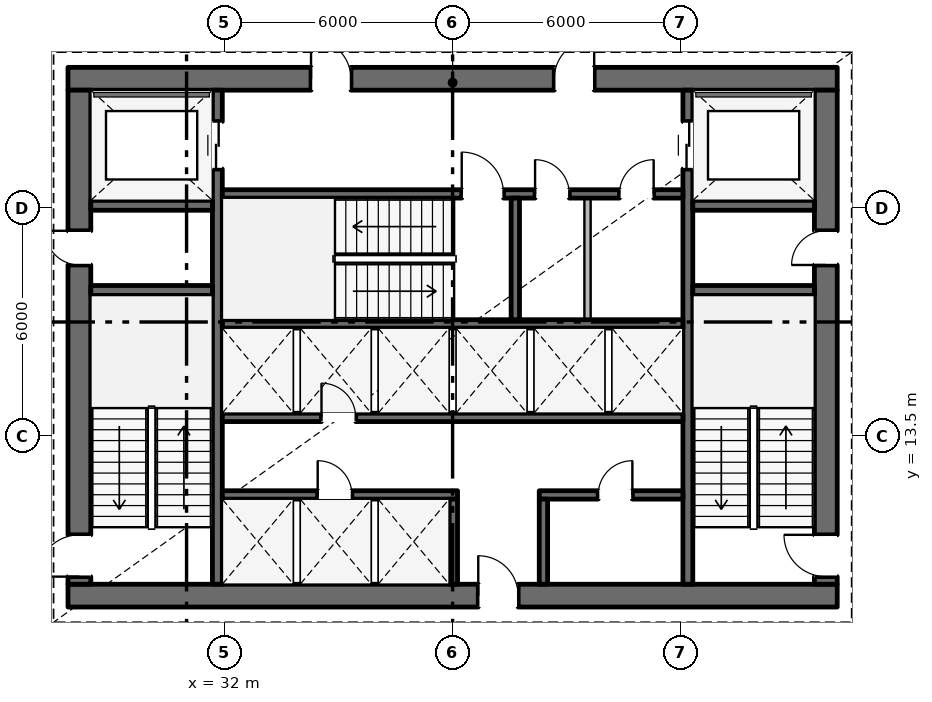
"""IFC4 building model, lengths in metres.
Left out: names, types, materials, properties, quantities, classifications, styles, units other than length and angle.
Written with IfcOpenShell. Run it as: python <this file> out.ifc"""

import sys

from ifc_helpers import new_model, si_unit, direction, frame, frame_2d, origin, place, context, subcontext, project, spatial, rectangle, extrude, element, fill, save


model = new_model("IFC4")
c1 = context("Model", 3, precision=1e-05, world=origin(), true_north=direction((0.0, 1.0)))
c2 = subcontext(c1, "Body", "Model", "MODEL_VIEW")
j1 = project(units=[si_unit("LENGTHUNIT", "METRE"), si_unit("PLANEANGLEUNIT", "RADIAN")], contexts=[c1])
p1 = place(None, origin())
s1 = spatial("IfcSite", under=j1, at=p1, CompositionType="ELEMENT")
p2 = place(p1, origin())
s2 = spatial("IfcBuilding", under=s1, at=p2, CompositionType="ELEMENT")
p3 = place(p2, frame((0.0, 0.0, -8.4)))
s3 = spatial("IfcBuildingStorey", under=s2, at=p3, CompositionType="ELEMENT", Elevation=-8.4)
for number, where, z_axis, x_axis in (
    (1, (29.622, 43.889, 0.0), (0.0, 0.0, 1.0), (-0.5, -0.866, 0.0)),
    (2, (62.878, 15.311, 0.0), (0.0, 0.0, 1.0), (-0.5, 0.866, 0.0)),
):
    element("IfcWall", number, at=place(p3, frame(where, z_axis=z_axis, x_axis=x_axis)), inside=s3, PredefinedType="SHEAR", context=c2, shape_type="SweptSolid", body=[
        extrude(rectangle(XDim=33.0, YDim=0.5, at=frame_2d((16.5, 0.0))), origin(), (0.0, 0.0, 1.0), 3.95),
    ])
p4 = place(p3, frame((27.88, 9.3, 0.0), z_axis=(0.0, 0.0, 1.0), x_axis=(1.0, 0.0, 0.0)))
e3 = element("IfcWall", 3, at=p4, inside=s3, PredefinedType="SOLIDWALL", context=c2, shape_type="SweptSolid", body=[
    extrude(rectangle(XDim=20.24, YDim=0.6, at=frame_2d((10.12, 0.0))), origin(), (0.0, 0.0, 1.0), 3.95),
])
p5 = place(p4, frame((10.795, 0.0, 0.0)))
e4 = element("IfcOpeningElement", 4, at=p5, cuts=e3, PredefinedType="OPENING", context=c2, shape_type="SweptSolid", body=[
    extrude(rectangle(XDim=1.05, YDim=2.15, at=frame_2d((0.525, 1.075))), frame((0.0, 0.31, 0.0), z_axis=(0.0, -1.0, 0.0), x_axis=(1.0, 0.0, 0.0)), (0.0, 0.0, 1.0), 0.62),
])
p6 = place(p3, frame((27.88, 22.9, 0.0), z_axis=(0.0, 0.0, 1.0), x_axis=(1.0, 0.0, 0.0)))
e5 = element("IfcWall", 5, at=p6, inside=s3, PredefinedType="SOLIDWALL", context=c2, shape_type="SweptSolid", body=[
    extrude(rectangle(XDim=20.24, YDim=0.6, at=frame_2d((10.12, 0.0))), origin(), (0.0, 0.0, 1.0), 3.95),
])
p7 = place(p6, frame((6.395, 0.0, 0.0)))
e6 = element("IfcOpeningElement", 6, at=p7, cuts=e5, PredefinedType="OPENING", context=c2, shape_type="SweptSolid", body=[
    extrude(rectangle(XDim=1.05, YDim=2.15, at=frame_2d((0.525, 1.075))), frame((0.0, 0.31, 0.0), z_axis=(0.0, -1.0, 0.0), x_axis=(1.0, 0.0, 0.0)), (0.0, 0.0, 1.0), 0.62),
])
p8 = place(p6, frame((12.795, 0.0, 0.0)))
e7 = element("IfcOpeningElement", 7, at=p8, cuts=e5, PredefinedType="OPENING", context=c2, shape_type="SweptSolid", body=[
    extrude(rectangle(XDim=1.05, YDim=2.15, at=frame_2d((0.525, 1.075))), frame((0.0, 0.31, 0.0), z_axis=(0.0, -1.0, 0.0), x_axis=(1.0, 0.0, 0.0)), (0.0, 0.0, 1.0), 0.62),
])
p9 = place(p3, frame((28.18, 9.6, 0.0), z_axis=(0.0, 0.0, 1.0), x_axis=(0.0, 1.0, 0.0)))
e8 = element("IfcWall", 8, at=p9, inside=s3, PredefinedType="SOLIDWALL", context=c2, shape_type="SweptSolid", body=[
    extrude(rectangle(XDim=13.0, YDim=0.6, at=frame_2d((6.5, 0.0))), origin(), (0.0, 0.0, 1.0), 3.95),
])
p10 = place(p9, frame((0.2, 0.0, 0.0)))
e9 = element("IfcOpeningElement", 9, at=p10, cuts=e8, PredefinedType="OPENING", context=c2, shape_type="SweptSolid", body=[
    extrude(rectangle(XDim=1.1, YDim=2.15, at=frame_2d((0.55, 1.075))), frame((0.0, 0.31, 0.0), z_axis=(0.0, -1.0, 0.0), x_axis=(1.0, 0.0, 0.0)), (0.0, 0.0, 1.0), 0.62),
])
p11 = place(p9, frame((8.4, 0.0, 0.0)))
e10 = element("IfcOpeningElement", 10, at=p11, cuts=e8, PredefinedType="OPENING", context=c2, shape_type="SweptSolid", body=[
    extrude(rectangle(XDim=0.9, YDim=2.1, at=frame_2d((0.45, 1.05))), frame((0.0, 0.31, 0.0), z_axis=(0.0, -1.0, 0.0), x_axis=(1.0, 0.0, 0.0)), (0.0, 0.0, 1.0), 0.62),
])
p12 = place(p3, frame((47.82, 9.6, 0.0), z_axis=(0.0, 0.0, 1.0), x_axis=(0.0, 1.0, 0.0)))
e11 = element("IfcWall", 11, at=p12, inside=s3, PredefinedType="SOLIDWALL", context=c2, shape_type="SweptSolid", body=[
    extrude(rectangle(XDim=13.0, YDim=0.6, at=frame_2d((6.5, 0.0))), origin(), (0.0, 0.0, 1.0), 3.95),
])
p13 = place(p12, frame((0.2, 0.0, 0.0)))
e12 = element("IfcOpeningElement", 12, at=p13, cuts=e11, PredefinedType="OPENING", context=c2, shape_type="SweptSolid", body=[
    extrude(rectangle(XDim=1.1, YDim=2.15, at=frame_2d((0.55, 1.075))), frame((0.0, 0.31, 0.0), z_axis=(0.0, -1.0, 0.0), x_axis=(1.0, 0.0, 0.0)), (0.0, 0.0, 1.0), 0.62),
])
p14 = place(p12, frame((8.4, 0.0, 0.0)))
e13 = element("IfcOpeningElement", 13, at=p14, cuts=e11, PredefinedType="OPENING", context=c2, shape_type="SweptSolid", body=[
    extrude(rectangle(XDim=0.9, YDim=2.1, at=frame_2d((0.45, 1.05))), frame((0.0, 0.31, 0.0), z_axis=(0.0, -1.0, 0.0), x_axis=(1.0, 0.0, 0.0)), (0.0, 0.0, 1.0), 0.62),
])
p15 = place(p3, frame((31.81, 9.6, 0.0), z_axis=(0.0, 0.0, 1.0), x_axis=(0.0, 1.0, 0.0)))
e14 = element("IfcWall", 14, at=p15, inside=s3, PredefinedType="SHEAR", context=c2, shape_type="SweptSolid", body=[
    extrude(rectangle(XDim=13.0, YDim=0.26, at=frame_2d((6.5, 0.0))), origin(), (0.0, 0.0, 1.0), 3.95),
])
p16 = place(p15, frame((10.925, 0.0, 0.0)))
e15 = element("IfcOpeningElement", 15, at=p16, cuts=e14, PredefinedType="OPENING", context=c2, shape_type="SweptSolid", body=[
    extrude(rectangle(XDim=1.25, YDim=2.25, at=frame_2d((0.625, 1.125))), frame((0.0, 0.14, 0.0), z_axis=(0.0, -1.0, 0.0), x_axis=(1.0, 0.0, 0.0)), (0.0, 0.0, 1.0), 0.28),
])
p17 = place(p3, frame((44.19, 9.6, 0.0), z_axis=(0.0, 0.0, 1.0), x_axis=(0.0, 1.0, 0.0)))
e16 = element("IfcWall", 16, at=p17, inside=s3, PredefinedType="SHEAR", context=c2, shape_type="SweptSolid", body=[
    extrude(rectangle(XDim=13.0, YDim=0.26, at=frame_2d((6.5, 0.0))), origin(), (0.0, 0.0, 1.0), 3.95),
])
p18 = place(p17, frame((10.925, 0.0, 0.0)))
e17 = element("IfcOpeningElement", 17, at=p18, cuts=e16, PredefinedType="OPENING", context=c2, shape_type="SweptSolid", body=[
    extrude(rectangle(XDim=1.25, YDim=2.25, at=frame_2d((0.625, 1.125))), frame((0.0, 0.14, 0.0), z_axis=(0.0, -1.0, 0.0), x_axis=(1.0, 0.0, 0.0)), (0.0, 0.0, 1.0), 0.28),
])
for number, where, z_axis, x_axis in (
    (18, (28.48, 17.33, 0.0), (0.0, 0.0, 1.0), (1.0, 0.0, 0.0)),
    (19, (28.48, 19.57, 0.0), (0.0, 0.0, 1.0), (1.0, 0.0, 0.0)),
    (20, (44.32, 17.33, 0.0), (0.0, 0.0, 1.0), (1.0, 0.0, 0.0)),
    (21, (44.32, 19.57, 0.0), (0.0, 0.0, 1.0), (1.0, 0.0, 0.0)),
):
    element("IfcWall", number, at=place(p3, frame(where, z_axis=z_axis, x_axis=x_axis)), inside=s3, PredefinedType="SHEAR", context=c2, shape_type="SweptSolid", body=[
        extrude(rectangle(XDim=3.2, YDim=0.26, at=frame_2d((1.6, 0.0))), origin(), (0.0, 0.0, 1.0), 3.95),
    ])
p19 = place(p3, frame((31.94, 19.87, 0.0), z_axis=(0.0, 0.0, 1.0), x_axis=(1.0, 0.0, 0.0)))
e22 = element("IfcWall", 22, at=p19, inside=s3, PredefinedType="SOLIDWALL", context=c2, shape_type="SweptSolid", body=[
    extrude(rectangle(XDim=12.12, YDim=0.22, at=frame_2d((6.06, 0.0))), origin(), (0.0, 0.0, 1.0), 3.95),
])
p20 = place(p19, frame((6.3, 0.0, 0.0)))
e23 = element("IfcOpeningElement", 23, at=p20, cuts=e22, PredefinedType="OPENING", context=c2, shape_type="SweptSolid", body=[
    extrude(rectangle(XDim=1.1, YDim=2.15, at=frame_2d((0.55, 1.075))), frame((0.0, 0.12, 0.0), z_axis=(0.0, -1.0, 0.0), x_axis=(1.0, 0.0, 0.0)), (0.0, 0.0, 1.0), 0.24),
])
p21 = place(p19, frame((8.23, 0.0, 0.0)))
e24 = element("IfcOpeningElement", 24, at=p21, cuts=e22, PredefinedType="OPENING", context=c2, shape_type="SweptSolid", body=[
    extrude(rectangle(XDim=0.9, YDim=2.1, at=frame_2d((0.45, 1.05))), frame((0.0, 0.12, 0.0), z_axis=(0.0, -1.0, 0.0), x_axis=(1.0, 0.0, 0.0)), (0.0, 0.0, 1.0), 0.24),
])
p22 = place(p19, frame((10.45, 0.0, 0.0)))
e25 = element("IfcOpeningElement", 25, at=p22, cuts=e22, PredefinedType="OPENING", context=c2, shape_type="SweptSolid", body=[
    extrude(rectangle(XDim=0.9, YDim=2.1, at=frame_2d((0.45, 1.05))), frame((0.0, 0.12, 0.0), z_axis=(0.0, -1.0, 0.0), x_axis=(1.0, 0.0, 0.0)), (0.0, 0.0, 1.0), 0.24),
])
p23 = place(p3, frame((31.94, 16.45, 0.0), z_axis=(0.0, 0.0, 1.0), x_axis=(1.0, 0.0, 0.0)))
e26 = element("IfcWall", 26, at=p23, inside=s3, PredefinedType="SOLIDWALL", context=c2, shape_type="SweptSolid", body=[
    extrude(rectangle(XDim=12.12, YDim=0.22, at=frame_2d((6.06, 0.0))), origin(), (0.0, 0.0, 1.0), 3.95),
])
p24 = place(p3, frame((39.65, 16.56, 0.0), z_axis=(0.0, 0.0, 1.0), x_axis=(0.0, 1.0, 0.0)))
e27 = element("IfcWall", 27, at=p24, inside=s3, PredefinedType="SOLIDWALL", context=c2, shape_type="SweptSolid", body=[
    extrude(rectangle(XDim=3.2, YDim=0.22, at=frame_2d((1.6, 0.0))), origin(), (0.0, 0.0, 1.0), 3.95),
])
p25 = place(p3, frame((31.94, 13.99, 0.0), z_axis=(0.0, 0.0, 1.0), x_axis=(1.0, 0.0, 0.0)))
e28 = element("IfcWall", 28, at=p25, inside=s3, PredefinedType="SOLIDWALL", context=c2, shape_type="SweptSolid", body=[
    extrude(rectangle(XDim=12.12, YDim=0.22, at=frame_2d((6.06, 0.0))), origin(), (0.0, 0.0, 1.0), 3.95),
])
p26 = place(p25, frame((2.61, 0.0, 0.0)))
e29 = element("IfcOpeningElement", 29, at=p26, cuts=e28, PredefinedType="OPENING", context=c2, shape_type="SweptSolid", body=[
    extrude(rectangle(XDim=0.9, YDim=2.1, at=frame_2d((0.45, 1.05))), frame((0.0, 0.12, 0.0), z_axis=(0.0, -1.0, 0.0), x_axis=(1.0, 0.0, 0.0)), (0.0, 0.0, 1.0), 0.24),
])
p27 = place(p3, frame((31.94, 11.95, 0.0), z_axis=(0.0, 0.0, 1.0), x_axis=(1.0, 0.0, 0.0)))
e30 = element("IfcWall", 30, at=p27, inside=s3, PredefinedType="SOLIDWALL", context=c2, shape_type="SweptSolid", body=[
    extrude(rectangle(XDim=6.19, YDim=0.22, at=frame_2d((3.095, 0.0))), origin(), (0.0, 0.0, 1.0), 3.95),
])
p28 = place(p27, frame((2.51, 0.0, 0.0)))
e31 = element("IfcOpeningElement", 31, at=p28, cuts=e30, PredefinedType="OPENING", context=c2, shape_type="SweptSolid", body=[
    extrude(rectangle(XDim=0.9, YDim=2.1, at=frame_2d((0.45, 1.05))), frame((0.0, 0.12, 0.0), z_axis=(0.0, -1.0, 0.0), x_axis=(1.0, 0.0, 0.0)), (0.0, 0.0, 1.0), 0.24),
])
p29 = place(p3, frame((40.28, 11.95, 0.0), z_axis=(0.0, 0.0, 1.0), x_axis=(1.0, 0.0, 0.0)))
e32 = element("IfcWall", 32, at=p29, inside=s3, PredefinedType="SOLIDWALL", context=c2, shape_type="SweptSolid", body=[
    extrude(rectangle(XDim=3.78, YDim=0.22, at=frame_2d((1.89, 0.0))), origin(), (0.0, 0.0, 1.0), 3.95),
])
p30 = place(p29, frame((1.55, 0.0, 0.0)))
e33 = element("IfcOpeningElement", 33, at=p30, cuts=e32, PredefinedType="OPENING", context=c2, shape_type="SweptSolid", body=[
    extrude(rectangle(XDim=0.9, YDim=2.1, at=frame_2d((0.45, 1.05))), frame((0.0, 0.12, 0.0), z_axis=(0.0, -1.0, 0.0), x_axis=(1.0, 0.0, 0.0)), (0.0, 0.0, 1.0), 0.24),
])
for number, where, z_axis, x_axis in (
    (34, (38.02, 9.6, 0.0), (0.0, 0.0, 1.0), (0.0, 1.0, 0.0)),
    (35, (40.39, 9.6, 0.0), (0.0, 0.0, 1.0), (0.0, 1.0, 0.0)),
):
    element("IfcWall", number, at=place(p3, frame(where, z_axis=z_axis, x_axis=x_axis)), inside=s3, PredefinedType="SOLIDWALL", context=c2, shape_type="SweptSolid", body=[
        extrude(rectangle(XDim=2.24, YDim=0.22, at=frame_2d((1.12, 0.0))), origin(), (0.0, 0.0, 1.0), 3.95),
    ])
p31 = place(p3, frame((41.55, 16.56, 0.0), z_axis=(0.0, 0.0, 1.0), x_axis=(0.0, 1.0, 0.0)))
e36 = element("IfcWall", 36, at=p31, inside=s3, PredefinedType="PARTITIONING", context=c2, shape_type="SweptSolid", body=[
    extrude(rectangle(XDim=3.2, YDim=0.165, at=frame_2d((1.6, 0.0))), origin(), (0.0, 0.0, 1.0), 3.95),
])
p32 = place(p10, origin())
e37 = element("IfcDoor", 37, at=p32, inside=s3, OperationType="SINGLE_SWING_LEFT", PredefinedType="DOOR", context=c2, shape_type="SweptSolid", body=[
    extrude(rectangle(XDim=1.1, YDim=2.15, at=frame_2d((0.55, 1.075))), frame((0.0, 0.025, 0.0), z_axis=(0.0, -1.0, 0.0), x_axis=(1.0, 0.0, 0.0)), (0.0, 0.0, 1.0), 0.05),
])
fill(e9, e37)
p33 = place(p13, origin())
e38 = element("IfcDoor", 38, at=p33, inside=s3, OperationType="SINGLE_SWING_RIGHT", PredefinedType="DOOR", context=c2, shape_type="SweptSolid", body=[
    extrude(rectangle(XDim=1.1, YDim=2.15, at=frame_2d((0.55, 1.075))), frame((0.0, 0.025, 0.0), z_axis=(0.0, -1.0, 0.0), x_axis=(1.0, 0.0, 0.0)), (0.0, 0.0, 1.0), 0.05),
])
fill(e12, e38)
p34 = place(p20, origin())
e39 = element("IfcDoor", 39, at=p34, inside=s3, OperationType="SINGLE_SWING_LEFT", PredefinedType="DOOR", context=c2, shape_type="SweptSolid", body=[
    extrude(rectangle(XDim=1.1, YDim=2.15, at=frame_2d((0.55, 1.075))), frame((0.0, 0.025, 0.0), z_axis=(0.0, -1.0, 0.0), x_axis=(1.0, 0.0, 0.0)), (0.0, 0.0, 1.0), 0.05),
])
fill(e23, e39)
p35 = place(p11, origin())
e40 = element("IfcDoor", 40, at=p35, inside=s3, OperationType="SINGLE_SWING_RIGHT", PredefinedType="DOOR", context=c2, shape_type="SweptSolid", body=[
    extrude(rectangle(XDim=0.9, YDim=2.1, at=frame_2d((0.45, 1.05))), frame((0.0, 0.025, 0.0), z_axis=(0.0, -1.0, 0.0), x_axis=(1.0, 0.0, 0.0)), (0.0, 0.0, 1.0), 0.05),
])
fill(e10, e40)
p36 = place(p14, origin())
e41 = element("IfcDoor", 41, at=p36, inside=s3, OperationType="SINGLE_SWING_LEFT", PredefinedType="DOOR", context=c2, shape_type="SweptSolid", body=[
    extrude(rectangle(XDim=0.9, YDim=2.1, at=frame_2d((0.45, 1.05))), frame((0.0, 0.025, 0.0), z_axis=(0.0, -1.0, 0.0), x_axis=(1.0, 0.0, 0.0)), (0.0, 0.0, 1.0), 0.05),
])
fill(e13, e41)
p37 = place(p7, origin())
e42 = element("IfcDoor", 42, at=p37, inside=s3, OperationType="SINGLE_SWING_LEFT", PredefinedType="DOOR", context=c2, shape_type="SweptSolid", body=[
    extrude(rectangle(XDim=1.05, YDim=2.15, at=frame_2d((0.525, 1.075))), frame((0.0, 0.025, 0.0), z_axis=(0.0, -1.0, 0.0), x_axis=(1.0, 0.0, 0.0)), (0.0, 0.0, 1.0), 0.05),
])
fill(e6, e42)
p38 = place(p8, origin())
e43 = element("IfcDoor", 43, at=p38, inside=s3, OperationType="SINGLE_SWING_RIGHT", PredefinedType="DOOR", context=c2, shape_type="SweptSolid", body=[
    extrude(rectangle(XDim=1.05, YDim=2.15, at=frame_2d((0.525, 1.075))), frame((0.0, 0.025, 0.0), z_axis=(0.0, -1.0, 0.0), x_axis=(1.0, 0.0, 0.0)), (0.0, 0.0, 1.0), 0.05),
])
fill(e7, e43)
p39 = place(p16, origin())
e44 = element("IfcDoor", 44, at=p39, inside=s3, OperationType="DOUBLE_DOOR_SLIDING", PredefinedType="DOOR", context=c2, shape_type="SweptSolid", body=[
    extrude(rectangle(XDim=1.25, YDim=2.25, at=frame_2d((0.625, 1.125))), frame((0.0, 0.025, 0.0), z_axis=(0.0, -1.0, 0.0), x_axis=(1.0, 0.0, 0.0)), (0.0, 0.0, 1.0), 0.05),
])
fill(e15, e44)
p40 = place(p18, origin())
e45 = element("IfcDoor", 45, at=p40, inside=s3, OperationType="DOUBLE_DOOR_SLIDING", PredefinedType="DOOR", context=c2, shape_type="SweptSolid", body=[
    extrude(rectangle(XDim=1.25, YDim=2.25, at=frame_2d((0.625, 1.125))), frame((0.0, 0.025, 0.0), z_axis=(0.0, -1.0, 0.0), x_axis=(1.0, 0.0, 0.0)), (0.0, 0.0, 1.0), 0.05),
])
fill(e17, e45)
p41 = place(p5, origin())
e46 = element("IfcDoor", 46, at=p41, inside=s3, OperationType="SINGLE_SWING_LEFT", PredefinedType="DOOR", context=c2, shape_type="SweptSolid", body=[
    extrude(rectangle(XDim=1.05, YDim=2.15, at=frame_2d((0.525, 1.075))), frame((0.0, 0.025, 0.0), z_axis=(0.0, -1.0, 0.0), x_axis=(1.0, 0.0, 0.0)), (0.0, 0.0, 1.0), 0.05),
])
fill(e4, e46)
p42 = place(p28, origin())
e47 = element("IfcDoor", 47, at=p42, inside=s3, OperationType="SINGLE_SWING_LEFT", PredefinedType="DOOR", context=c2, shape_type="SweptSolid", body=[
    extrude(rectangle(XDim=0.9, YDim=2.1, at=frame_2d((0.45, 1.05))), frame((0.0, 0.025, 0.0), z_axis=(0.0, -1.0, 0.0), x_axis=(1.0, 0.0, 0.0)), (0.0, 0.0, 1.0), 0.05),
])
fill(e31, e47)
p43 = place(p26, origin())
e48 = element("IfcDoor", 48, at=p43, inside=s3, OperationType="SINGLE_SWING_LEFT", PredefinedType="DOOR", context=c2, shape_type="SweptSolid", body=[
    extrude(rectangle(XDim=0.9, YDim=2.1, at=frame_2d((0.45, 1.05))), frame((0.0, 0.025, 0.0), z_axis=(0.0, -1.0, 0.0), x_axis=(1.0, 0.0, 0.0)), (0.0, 0.0, 1.0), 0.05),
])
fill(e29, e48)
p44 = place(p21, origin())
e49 = element("IfcDoor", 49, at=p44, inside=s3, OperationType="SINGLE_SWING_LEFT", PredefinedType="DOOR", context=c2, shape_type="SweptSolid", body=[
    extrude(rectangle(XDim=0.9, YDim=2.1, at=frame_2d((0.45, 1.05))), frame((0.0, 0.025, 0.0), z_axis=(0.0, -1.0, 0.0), x_axis=(1.0, 0.0, 0.0)), (0.0, 0.0, 1.0), 0.05),
])
fill(e24, e49)
p45 = place(p22, origin())
e50 = element("IfcDoor", 50, at=p45, inside=s3, OperationType="SINGLE_SWING_RIGHT", PredefinedType="DOOR", context=c2, shape_type="SweptSolid", body=[
    extrude(rectangle(XDim=0.9, YDim=2.1, at=frame_2d((0.45, 1.05))), frame((0.0, 0.025, 0.0), z_axis=(0.0, -1.0, 0.0), x_axis=(1.0, 0.0, 0.0)), (0.0, 0.0, 1.0), 0.05),
])
fill(e25, e50)
p46 = place(p30, origin())
e51 = element("IfcDoor", 51, at=p46, inside=s3, OperationType="SINGLE_SWING_RIGHT", PredefinedType="DOOR", context=c2, shape_type="SweptSolid", body=[
    extrude(rectangle(XDim=0.9, YDim=2.1, at=frame_2d((0.45, 1.05))), frame((0.0, 0.025, 0.0), z_axis=(0.0, -1.0, 0.0), x_axis=(1.0, 0.0, 0.0)), (0.0, 0.0, 1.0), 0.05),
])
fill(e33, e51)
save(model, sys.argv[1])
